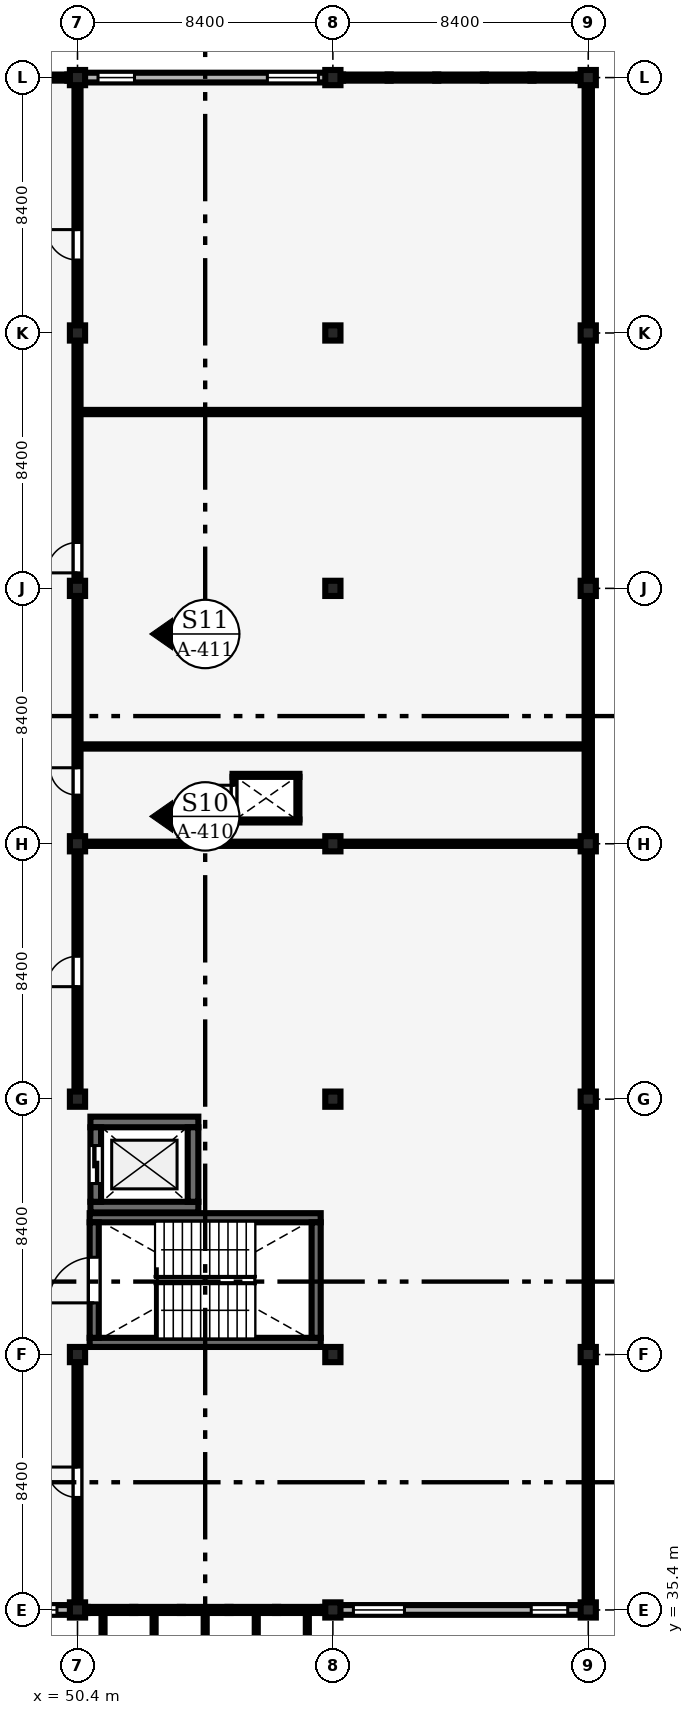
"""IFC4 building model, lengths in metres.
Left out: names, types, materials, properties, quantities, classifications, styles, units other than length and angle.
Written with IfcOpenShell. Run it as: python <this file> out.ifc"""

import sys

from ifc_helpers import new_model, si_unit, direction, frame, frame_2d, origin, origin_2d, place, context, subcontext, project, spatial, rectangle, extrude, element, fill, save


model = new_model("IFC4")
c1 = context("Model", 3, precision=1e-05, world=origin(), true_north=direction((0.0, 1.0)))
c2 = subcontext(c1, "Body", "Model", "MODEL_VIEW")
j1 = project(units=[si_unit("LENGTHUNIT", "METRE"), si_unit("PLANEANGLEUNIT", "RADIAN")], contexts=[c1])
p1 = place(None, origin())
s1 = spatial("IfcSite", under=j1, at=p1, CompositionType="ELEMENT")
p2 = place(p1, origin())
s2 = spatial("IfcBuilding", under=s1, at=p2, CompositionType="ELEMENT")
p3 = place(p2, frame((0.0, 0.0, 13.2)))
s3 = spatial("IfcBuildingStorey", under=s2, at=p3, CompositionType="ELEMENT", Elevation=13.2)
for number, where, z_axis, x_axis in (
    (1, (50.4, 35.4, 0.0), (0.0, 0.0, 1.0), (1.0, 0.0, 0.0)),
    (2, (50.4, 43.8, 0.0), (0.0, 0.0, 1.0), (1.0, 0.0, 0.0)),
    (3, (50.4, 52.2, 0.0), (0.0, 0.0, 1.0), (1.0, 0.0, 0.0)),
    (4, (50.4, 60.6, 0.0), (0.0, 0.0, 1.0), (1.0, 0.0, 0.0)),
    (5, (50.4, 69.0, 0.0), (0.0, 0.0, 1.0), (1.0, 0.0, 0.0)),
    (6, (50.4, 77.4, 0.0), (0.0, 0.0, 1.0), (1.0, 0.0, 0.0)),
    (7, (50.4, 85.8, 0.0), (0.0, 0.0, 1.0), (1.0, 0.0, 0.0)),
    (8, (58.8, 35.4, 0.0), (0.0, 0.0, 1.0), (1.0, 0.0, 0.0)),
    (9, (58.8, 43.8, 0.0), (0.0, 0.0, 1.0), (1.0, 0.0, 0.0)),
    (10, (58.8, 52.2, 0.0), (0.0, 0.0, 1.0), (1.0, 0.0, 0.0)),
    (11, (58.8, 60.6, 0.0), (0.0, 0.0, 1.0), (1.0, 0.0, 0.0)),
    (12, (58.8, 69.0, 0.0), (0.0, 0.0, 1.0), (1.0, 0.0, 0.0)),
    (13, (58.8, 77.4, 0.0), (0.0, 0.0, 1.0), (1.0, 0.0, 0.0)),
    (14, (58.8, 85.8, 0.0), (0.0, 0.0, 1.0), (1.0, 0.0, 0.0)),
    (15, (67.2, 35.4, 0.0), (0.0, 0.0, 1.0), (1.0, 0.0, 0.0)),
    (16, (67.2, 43.8, 0.0), (0.0, 0.0, 1.0), (1.0, 0.0, 0.0)),
    (17, (67.2, 52.2, 0.0), (0.0, 0.0, 1.0), (1.0, 0.0, 0.0)),
    (18, (67.2, 60.6, 0.0), (0.0, 0.0, 1.0), (1.0, 0.0, 0.0)),
    (19, (67.2, 69.0, 0.0), (0.0, 0.0, 1.0), (1.0, 0.0, 0.0)),
    (20, (67.2, 77.4, 0.0), (0.0, 0.0, 1.0), (1.0, 0.0, 0.0)),
    (21, (67.2, 85.8, 0.0), (0.0, 0.0, 1.0), (1.0, 0.0, 0.0)),
):
    element("IfcColumn", number, at=place(p3, frame(where, z_axis=z_axis, x_axis=x_axis)), inside=s3, PredefinedType="COLUMN", context=c2, shape_type="SweptSolid", body=[
        extrude(rectangle(XDim=0.5, YDim=0.5, at=origin_2d()), origin(), (0.0, 0.0, 1.0), 4.2),
    ])
p4 = place(p3, frame((42.225, 35.4, 0.0), z_axis=(0.0, 0.0, 1.0), x_axis=(1.0, 0.0, 0.0)))
e22 = element("IfcWall", 22, at=p4, inside=s3, PredefinedType="SOLIDWALL", context=c2, shape_type="SweptSolid", body=[
    extrude(rectangle(XDim=7.95, YDim=0.32, at=frame_2d((3.975, 0.0))), origin(), (0.0, 0.0, 1.0), 2.98),
])
p5 = place(p4, frame((0.45, 0.0, 0.9)))
e23 = element("IfcOpeningElement", 23, at=p5, cuts=e22, PredefinedType="OPENING", context=c2, shape_type="SweptSolid", body=[
    extrude(rectangle(XDim=1.2, YDim=1.5, at=frame_2d((0.6, 0.75))), frame((0.0, 0.17, 0.0), z_axis=(0.0, -1.0, 0.0), x_axis=(1.0, 0.0, 0.0)), (0.0, 0.0, 1.0), 0.34),
])
p6 = place(p4, frame((6.3, 0.0, 0.9)))
e24 = element("IfcOpeningElement", 24, at=p6, cuts=e22, PredefinedType="OPENING", context=c2, shape_type="SweptSolid", body=[
    extrude(rectangle(XDim=1.2, YDim=1.8, at=frame_2d((0.6, 0.9))), frame((0.0, 0.17, 0.0), z_axis=(0.0, -1.0, 0.0), x_axis=(1.0, 0.0, 0.0)), (0.0, 0.0, 1.0), 0.34),
])
p7 = place(p3, frame((59.025, 35.4, 0.0), z_axis=(0.0, 0.0, 1.0), x_axis=(1.0, 0.0, 0.0)))
e25 = element("IfcWall", 25, at=p7, inside=s3, PredefinedType="SOLIDWALL", context=c2, shape_type="SweptSolid", body=[
    extrude(rectangle(XDim=7.95, YDim=0.32, at=frame_2d((3.975, 0.0))), origin(), (0.0, 0.0, 1.0), 2.93),
])
p8 = place(p7, frame((0.45, 0.0, 0.9)))
e26 = element("IfcOpeningElement", 26, at=p8, cuts=e25, PredefinedType="OPENING", context=c2, shape_type="SweptSolid", body=[
    extrude(rectangle(XDim=1.68, YDim=1.88, at=frame_2d((0.84, 0.94))), frame((0.0, 0.17, 0.0), z_axis=(0.0, -1.0, 0.0), x_axis=(1.0, 0.0, 0.0)), (0.0, 0.0, 1.0), 0.34),
])
p9 = place(p7, frame((6.3, 0.0, 0.9)))
e27 = element("IfcOpeningElement", 27, at=p9, cuts=e25, PredefinedType="OPENING", context=c2, shape_type="SweptSolid", body=[
    extrude(rectangle(XDim=1.2, YDim=1.5, at=frame_2d((0.6, 0.75))), frame((0.0, 0.17, 0.0), z_axis=(0.0, -1.0, 0.0), x_axis=(1.0, 0.0, 0.0)), (0.0, 0.0, 1.0), 0.34),
])
p10 = place(p3, frame((67.2, 35.625, 0.0), z_axis=(0.0, 0.0, 1.0), x_axis=(0.0, 1.0, 0.0)))
e28 = element("IfcWall", 28, at=p10, inside=s3, PredefinedType="SOLIDWALL", context=c2, shape_type="SweptSolid", body=[
    extrude(rectangle(XDim=7.95, YDim=0.24, at=frame_2d((3.975, 0.0))), origin(), (0.0, 0.0, 1.0), 1.15),
])
p11 = place(p3, frame((67.2, 44.025, 0.0), z_axis=(0.0, 0.0, 1.0), x_axis=(0.0, 1.0, 0.0)))
e29 = element("IfcWall", 29, at=p11, inside=s3, PredefinedType="SOLIDWALL", context=c2, shape_type="SweptSolid", body=[
    extrude(rectangle(XDim=7.95, YDim=0.24, at=frame_2d((3.975, 0.0))), origin(), (0.0, 0.0, 1.0), 1.15),
])
for number, where, z_axis, x_axis in (
    (30, (67.2, 52.425, 0.0), (0.0, 0.0, 1.0), (0.0, 1.0, 0.0)),
    (31, (67.2, 60.825, 0.0), (0.0, 0.0, 1.0), (0.0, 1.0, 0.0)),
    (32, (67.2, 69.225, 0.0), (0.0, 0.0, 1.0), (0.0, 1.0, 0.0)),
    (33, (67.2, 77.625, 0.0), (0.0, 0.0, 1.0), (0.0, 1.0, 0.0)),
):
    element("IfcWall", number, at=place(p3, frame(where, z_axis=z_axis, x_axis=x_axis)), inside=s3, PredefinedType="SOLIDWALL", context=c2, shape_type="SweptSolid", body=[
        extrude(rectangle(XDim=7.95, YDim=0.24, at=frame_2d((3.975, 0.0))), origin(), (0.0, 0.0, 1.0), 1.15),
    ])
p12 = place(p3, frame((50.625, 85.8, 0.0), z_axis=(0.0, 0.0, 1.0), x_axis=(1.0, 0.0, 0.0)))
e34 = element("IfcWall", 34, at=p12, inside=s3, PredefinedType="SOLIDWALL", context=c2, shape_type="SweptSolid", body=[
    extrude(rectangle(XDim=7.95, YDim=0.32, at=frame_2d((3.975, 0.0))), origin(), (0.0, 0.0, 1.0), 3.16),
])
p13 = place(p12, frame((0.45, 0.0, 0.9)))
e35 = element("IfcOpeningElement", 35, at=p13, cuts=e34, PredefinedType="OPENING", context=c2, shape_type="SweptSolid", body=[
    extrude(rectangle(XDim=1.2, YDim=1.8, at=frame_2d((0.6, 0.9))), frame((0.0, 0.17, 0.0), z_axis=(0.0, -1.0, 0.0), x_axis=(1.0, 0.0, 0.0)), (0.0, 0.0, 1.0), 0.34),
])
p14 = place(p12, frame((6.02, 0.0, 0.9)))
e36 = element("IfcOpeningElement", 36, at=p14, cuts=e34, PredefinedType="OPENING", context=c2, shape_type="SweptSolid", body=[
    extrude(rectangle(XDim=1.68, YDim=2.11, at=frame_2d((0.84, 1.055))), frame((0.0, 0.17, 0.0), z_axis=(0.0, -1.0, 0.0), x_axis=(1.0, 0.0, 0.0)), (0.0, 0.0, 1.0), 0.34),
])
for number, where, z_axis, x_axis in (
    (37, (50.8, 44.2, 0.0), (0.0, 0.0, 1.0), (1.0, 0.0, 0.0)),
    (38, (50.8, 48.3, 0.0), (0.0, 0.0, 1.0), (1.0, 0.0, 0.0)),
):
    element("IfcWall", number, at=place(p3, frame(where, z_axis=z_axis, x_axis=x_axis)), inside=s3, PredefinedType="SHEAR", context=c2, shape_type="SweptSolid", body=[
        extrude(rectangle(XDim=7.6, YDim=0.3, at=frame_2d((3.8, 0.0))), origin(), (0.0, 0.0, 1.0), 4.025),
    ])
p15 = place(p3, frame((50.95, 44.35, 0.0), z_axis=(0.0, 0.0, 1.0), x_axis=(0.0, 1.0, 0.0)))
e39 = element("IfcWall", 39, at=p15, inside=s3, PredefinedType="SHEAR", context=c2, shape_type="SweptSolid", body=[
    extrude(rectangle(XDim=3.8, YDim=0.3, at=frame_2d((1.9, 0.0))), origin(), (0.0, 0.0, 1.0), 4.025),
])
p16 = place(p15, frame((1.15, 0.0, 0.0)))
e40 = element("IfcOpeningElement", 40, at=p16, cuts=e39, PredefinedType="OPENING", context=c2, shape_type="SweptSolid", body=[
    extrude(rectangle(XDim=1.5, YDim=2.2, at=frame_2d((0.75, 1.1))), frame((0.0, 0.16, 0.0), z_axis=(0.0, -1.0, 0.0), x_axis=(1.0, 0.0, 0.0)), (0.0, 0.0, 1.0), 0.32),
])
p17 = place(p3, frame((58.25, 44.35, 0.0), z_axis=(0.0, 0.0, 1.0), x_axis=(0.0, 1.0, 0.0)))
e41 = element("IfcWall", 41, at=p17, inside=s3, PredefinedType="SHEAR", context=c2, shape_type="SweptSolid", body=[
    extrude(rectangle(XDim=3.8, YDim=0.3, at=frame_2d((1.9, 0.0))), origin(), (0.0, 0.0, 1.0), 4.025),
])
for number, where, z_axis, x_axis in (
    (42, (50.825, 48.65, 0.0), (0.0, 0.0, 1.0), (1.0, 0.0, 0.0)),
    (43, (50.825, 51.45, 0.0), (0.0, 0.0, 1.0), (1.0, 0.0, 0.0)),
):
    element("IfcWall", number, at=place(p3, frame(where, z_axis=z_axis, x_axis=x_axis)), inside=s3, PredefinedType="SHEAR", context=c2, shape_type="SweptSolid", body=[
        extrude(rectangle(XDim=3.55, YDim=0.35, at=frame_2d((1.775, 0.0))), origin(), (0.0, 0.0, 1.0), 3.92),
    ])
p18 = place(p3, frame((51.0, 48.825, 0.0), z_axis=(0.0, 0.0, 1.0), x_axis=(0.0, 1.0, 0.0)))
e44 = element("IfcWall", 44, at=p18, inside=s3, PredefinedType="SHEAR", context=c2, shape_type="SweptSolid", body=[
    extrude(rectangle(XDim=2.45, YDim=0.35, at=frame_2d((1.225, 0.0))), origin(), (0.0, 0.0, 1.0), 3.92),
])
p19 = place(p18, frame((0.6, 0.0, 0.0)))
e45 = element("IfcOpeningElement", 45, at=p19, cuts=e44, PredefinedType="OPENING", context=c2, shape_type="SweptSolid", body=[
    extrude(rectangle(XDim=1.25, YDim=2.25, at=frame_2d((0.625, 1.125))), frame((0.0, 0.185, 0.0), z_axis=(0.0, -1.0, 0.0), x_axis=(1.0, 0.0, 0.0)), (0.0, 0.0, 1.0), 0.37),
])
p20 = place(p3, frame((54.2, 48.825, 0.0), z_axis=(0.0, 0.0, 1.0), x_axis=(0.0, 1.0, 0.0)))
e46 = element("IfcWall", 46, at=p20, inside=s3, PredefinedType="SHEAR", context=c2, shape_type="SweptSolid", body=[
    extrude(rectangle(XDim=2.45, YDim=0.35, at=frame_2d((1.225, 0.0))), origin(), (0.0, 0.0, 1.0), 3.92),
])
for number, where, z_axis, x_axis in (
    (47, (55.5, 61.35, 0.0), (0.0, 0.0, 1.0), (1.0, 0.0, 0.0)),
    (48, (55.5, 62.85, 0.0), (0.0, 0.0, 1.0), (1.0, 0.0, 0.0)),
):
    element("IfcWall", number, at=place(p3, frame(where, z_axis=z_axis, x_axis=x_axis)), inside=s3, PredefinedType="PARTITIONING", context=c2, shape_type="SweptSolid", body=[
        extrude(rectangle(XDim=2.2, YDim=0.1, at=frame_2d((1.1, 0.0))), origin(), (0.0, 0.0, 1.0), 3.9),
    ])
p21 = place(p3, frame((55.55, 61.4, 0.0), z_axis=(0.0, 0.0, 1.0), x_axis=(0.0, 1.0, 0.0)))
e49 = element("IfcWall", 49, at=p21, inside=s3, PredefinedType="PARTITIONING", context=c2, shape_type="SweptSolid", body=[
    extrude(rectangle(XDim=1.4, YDim=0.1, at=frame_2d((0.7, 0.0))), origin(), (0.0, 0.0, 1.0), 3.9),
])
p22 = place(p21, frame((0.275, 0.0, 0.0)))
e50 = element("IfcOpeningElement", 50, at=p22, cuts=e49, PredefinedType="OPENING", context=c2, shape_type="SweptSolid", body=[
    extrude(rectangle(XDim=0.85, YDim=2.05, at=frame_2d((0.425, 1.025))), frame((0.0, 0.06, 0.0), z_axis=(0.0, -1.0, 0.0), x_axis=(1.0, 0.0, 0.0)), (0.0, 0.0, 1.0), 0.12),
])
p23 = place(p3, frame((57.65, 61.4, 0.0), z_axis=(0.0, 0.0, 1.0), x_axis=(0.0, 1.0, 0.0)))
e51 = element("IfcWall", 51, at=p23, inside=s3, PredefinedType="PARTITIONING", context=c2, shape_type="SweptSolid", body=[
    extrude(rectangle(XDim=1.4, YDim=0.1, at=frame_2d((0.7, 0.0))), origin(), (0.0, 0.0, 1.0), 3.9),
])
p24 = place(p3, frame((50.4, 35.565, 0.0), z_axis=(0.0, 0.0, 1.0), x_axis=(0.0, 1.0, 0.0)))
e52 = element("IfcWall", 52, at=p24, inside=s3, PredefinedType="PARTITIONING", context=c2, shape_type="SweptSolid", body=[
    extrude(rectangle(XDim=7.975, YDim=0.2, at=frame_2d((3.988, 0.0))), origin(), (0.0, 0.0, 1.0), 2.83),
])
p25 = place(p24, frame((3.535, 0.0, 0.0)))
e53 = element("IfcOpeningElement", 53, at=p25, cuts=e52, PredefinedType="OPENING", context=c2, shape_type="SweptSolid", body=[
    extrude(rectangle(XDim=1.0, YDim=2.15, at=frame_2d((0.5, 1.075))), frame((0.0, 0.11, 0.0), z_axis=(0.0, -1.0, 0.0), x_axis=(1.0, 0.0, 0.0)), (0.0, 0.0, 1.0), 0.22),
])
p26 = place(p3, frame((50.505, 60.6, 0.0), z_axis=(0.0, 0.0, 1.0), x_axis=(1.0, 0.0, 0.0)))
e54 = element("IfcWall", 54, at=p26, inside=s3, PredefinedType="PARTITIONING", context=c2, shape_type="SweptSolid", body=[
    extrude(rectangle(XDim=8.035, YDim=0.14, at=frame_2d((4.018, 0.0))), origin(), (0.0, 0.0, 1.0), 3.11),
])
p27 = place(p3, frame((59.06, 60.6, 0.0), z_axis=(0.0, 0.0, 1.0), x_axis=(1.0, 0.0, 0.0)))
e55 = element("IfcWall", 55, at=p27, inside=s3, PredefinedType="PARTITIONING", context=c2, shape_type="SweptSolid", body=[
    extrude(rectangle(XDim=8.015, YDim=0.14, at=frame_2d((4.007, 0.0))), origin(), (0.0, 0.0, 1.0), 3.11),
])
for number, where, z_axis, x_axis in (
    (56, (50.505, 63.8, 0.0), (0.0, 0.0, 1.0), (1.0, 0.0, 0.0)),
    (57, (50.505, 74.8, 0.0), (0.0, 0.0, 1.0), (1.0, 0.0, 0.0)),
):
    element("IfcWall", number, at=place(p3, frame(where, z_axis=z_axis, x_axis=x_axis)), inside=s3, PredefinedType="PARTITIONING", context=c2, shape_type="SweptSolid", body=[
        extrude(rectangle(XDim=16.57, YDim=0.14, at=frame_2d((8.285, 0.0))), origin(), (0.0, 0.0, 1.0), 3.51),
    ])
p28 = place(p3, frame((50.4, 52.46, 0.0), z_axis=(0.0, 0.0, 1.0), x_axis=(0.0, 1.0, 0.0)))
e58 = element("IfcWall", 58, at=p28, inside=s3, PredefinedType="PARTITIONING", context=c2, shape_type="SweptSolid", body=[
    extrude(rectangle(XDim=7.88, YDim=0.2, at=frame_2d((3.94, 0.0))), origin(), (0.0, 0.0, 1.0), 3.36),
])
p29 = place(p28, frame((3.44, 0.0, 0.0)))
e59 = element("IfcOpeningElement", 59, at=p29, cuts=e58, PredefinedType="OPENING", context=c2, shape_type="SweptSolid", body=[
    extrude(rectangle(XDim=1.0, YDim=2.15, at=frame_2d((0.5, 1.075))), frame((0.0, 0.11, 0.0), z_axis=(0.0, -1.0, 0.0), x_axis=(1.0, 0.0, 0.0)), (0.0, 0.0, 1.0), 0.22),
])
p30 = place(p3, frame((50.4, 60.86, 0.0), z_axis=(0.0, 0.0, 1.0), x_axis=(0.0, 1.0, 0.0)))
e60 = element("IfcWall", 60, at=p30, inside=s3, PredefinedType="PARTITIONING", context=c2, shape_type="SweptSolid", body=[
    extrude(rectangle(XDim=7.88, YDim=0.2, at=frame_2d((3.94, 0.0))), origin(), (0.0, 0.0, 1.0), 3.36),
])
p31 = place(p30, frame((1.34, 0.0, 0.0)))
e61 = element("IfcOpeningElement", 61, at=p31, cuts=e60, PredefinedType="OPENING", context=c2, shape_type="SweptSolid", body=[
    extrude(rectangle(XDim=0.9, YDim=2.1, at=frame_2d((0.45, 1.05))), frame((0.0, 0.11, 0.0), z_axis=(0.0, -1.0, 0.0), x_axis=(1.0, 0.0, 0.0)), (0.0, 0.0, 1.0), 0.22),
])
p32 = place(p3, frame((50.4, 69.26, 0.0), z_axis=(0.0, 0.0, 1.0), x_axis=(0.0, 1.0, 0.0)))
e62 = element("IfcWall", 62, at=p32, inside=s3, PredefinedType="PARTITIONING", context=c2, shape_type="SweptSolid", body=[
    extrude(rectangle(XDim=7.88, YDim=0.2, at=frame_2d((3.94, 0.0))), origin(), (0.0, 0.0, 1.0), 3.31),
])
p33 = place(p32, frame((0.25, 0.0, 0.0)))
e63 = element("IfcOpeningElement", 63, at=p33, cuts=e62, PredefinedType="OPENING", context=c2, shape_type="SweptSolid", body=[
    extrude(rectangle(XDim=1.0, YDim=2.15, at=frame_2d((0.5, 1.075))), frame((0.0, 0.11, 0.0), z_axis=(0.0, -1.0, 0.0), x_axis=(1.0, 0.0, 0.0)), (0.0, 0.0, 1.0), 0.22),
])
p34 = place(p3, frame((50.4, 77.66, 0.0), z_axis=(0.0, 0.0, 1.0), x_axis=(0.0, 1.0, 0.0)))
e64 = element("IfcWall", 64, at=p34, inside=s3, PredefinedType="PARTITIONING", context=c2, shape_type="SweptSolid", body=[
    extrude(rectangle(XDim=8.035, YDim=0.2, at=frame_2d((4.018, 0.0))), origin(), (0.0, 0.0, 1.0), 3.26),
])
p35 = place(p34, frame((2.14, 0.0, 0.0)))
e65 = element("IfcOpeningElement", 65, at=p35, cuts=e64, PredefinedType="OPENING", context=c2, shape_type="SweptSolid", body=[
    extrude(rectangle(XDim=1.0, YDim=2.15, at=frame_2d((0.5, 1.075))), frame((0.0, 0.11, 0.0), z_axis=(0.0, -1.0, 0.0), x_axis=(1.0, 0.0, 0.0)), (0.0, 0.0, 1.0), 0.22),
])
p36 = place(p6, origin())
e66 = element("IfcWindow", 66, at=p36, inside=s3, PartitioningType="SINGLE_PANEL", PredefinedType="WINDOW", context=c2, shape_type="SweptSolid", body=[
    extrude(rectangle(XDim=1.2, YDim=1.8, at=frame_2d((0.6, 0.9))), frame((0.0, 0.03, 0.0), z_axis=(0.0, -1.0, 0.0), x_axis=(1.0, 0.0, 0.0)), (0.0, 0.0, 1.0), 0.06),
])
fill(e24, e66)
p37 = place(p8, origin())
e67 = element("IfcWindow", 67, at=p37, inside=s3, PartitioningType="SINGLE_PANEL", PredefinedType="WINDOW", context=c2, shape_type="SweptSolid", body=[
    extrude(rectangle(XDim=1.68, YDim=1.88, at=frame_2d((0.84, 0.94))), frame((0.0, 0.03, 0.0), z_axis=(0.0, -1.0, 0.0), x_axis=(1.0, 0.0, 0.0)), (0.0, 0.0, 1.0), 0.06),
])
fill(e26, e67)
p38 = place(p9, origin())
e68 = element("IfcWindow", 68, at=p38, inside=s3, PartitioningType="SINGLE_PANEL", PredefinedType="WINDOW", context=c2, shape_type="SweptSolid", body=[
    extrude(rectangle(XDim=1.2, YDim=1.5, at=frame_2d((0.6, 0.75))), frame((0.0, 0.03, 0.0), z_axis=(0.0, -1.0, 0.0), x_axis=(1.0, 0.0, 0.0)), (0.0, 0.0, 1.0), 0.06),
])
fill(e27, e68)
p39 = place(p13, origin())
e69 = element("IfcWindow", 69, at=p39, inside=s3, PartitioningType="SINGLE_PANEL", PredefinedType="WINDOW", context=c2, shape_type="SweptSolid", body=[
    extrude(rectangle(XDim=1.2, YDim=1.8, at=frame_2d((0.6, 0.9))), frame((0.0, 0.03, 0.0), z_axis=(0.0, -1.0, 0.0), x_axis=(1.0, 0.0, 0.0)), (0.0, 0.0, 1.0), 0.06),
])
fill(e35, e69)
p40 = place(p14, origin())
e70 = element("IfcWindow", 70, at=p40, inside=s3, PartitioningType="SINGLE_PANEL", PredefinedType="WINDOW", context=c2, shape_type="SweptSolid", body=[
    extrude(rectangle(XDim=1.68, YDim=2.11, at=frame_2d((0.84, 1.055))), frame((0.0, 0.03, 0.0), z_axis=(0.0, -1.0, 0.0), x_axis=(1.0, 0.0, 0.0)), (0.0, 0.0, 1.0), 0.06),
])
fill(e36, e70)
p41 = place(p16, origin())
e71 = element("IfcDoor", 71, at=p41, inside=s3, OperationType="DOUBLE_DOOR_SINGLE_SWING", PredefinedType="DOOR", context=c2, shape_type="SweptSolid", body=[
    extrude(rectangle(XDim=1.5, YDim=2.2, at=frame_2d((0.75, 1.1))), frame((0.0, 0.025, 0.0), z_axis=(0.0, -1.0, 0.0), x_axis=(1.0, 0.0, 0.0)), (0.0, 0.0, 1.0), 0.05),
])
fill(e40, e71)
p42 = place(p19, origin())
e72 = element("IfcDoor", 72, at=p42, inside=s3, OperationType="DOUBLE_DOOR_SLIDING", PredefinedType="DOOR", context=c2, shape_type="SweptSolid", body=[
    extrude(rectangle(XDim=1.25, YDim=2.25, at=frame_2d((0.625, 1.125))), frame((0.0, 0.025, 0.0), z_axis=(0.0, -1.0, 0.0), x_axis=(1.0, 0.0, 0.0)), (0.0, 0.0, 1.0), 0.05),
])
fill(e45, e72)
p43 = place(p22, origin())
e73 = element("IfcDoor", 73, at=p43, inside=s3, OperationType="SINGLE_SWING_RIGHT", PredefinedType="DOOR", context=c2, shape_type="SweptSolid", body=[
    extrude(rectangle(XDim=0.85, YDim=2.05, at=frame_2d((0.425, 1.025))), frame((0.0, 0.025, 0.0), z_axis=(0.0, -1.0, 0.0), x_axis=(1.0, 0.0, 0.0)), (0.0, 0.0, 1.0), 0.05),
])
fill(e50, e73)
p44 = place(p25, origin())
e74 = element("IfcDoor", 74, at=p44, inside=s3, OperationType="SINGLE_SWING_RIGHT", PredefinedType="DOOR", context=c2, shape_type="SweptSolid", body=[
    extrude(rectangle(XDim=1.0, YDim=2.15, at=frame_2d((0.5, 1.075))), frame((0.0, 0.025, 0.0), z_axis=(0.0, -1.0, 0.0), x_axis=(1.0, 0.0, 0.0)), (0.0, 0.0, 1.0), 0.05),
])
fill(e53, e74)
p45 = place(p29, origin())
e75 = element("IfcDoor", 75, at=p45, inside=s3, OperationType="SINGLE_SWING_LEFT", PredefinedType="DOOR", context=c2, shape_type="SweptSolid", body=[
    extrude(rectangle(XDim=1.0, YDim=2.15, at=frame_2d((0.5, 1.075))), frame((0.0, 0.025, 0.0), z_axis=(0.0, -1.0, 0.0), x_axis=(1.0, 0.0, 0.0)), (0.0, 0.0, 1.0), 0.05),
])
fill(e59, e75)
p46 = place(p31, origin())
e76 = element("IfcDoor", 76, at=p46, inside=s3, OperationType="SINGLE_SWING_RIGHT", PredefinedType="DOOR", context=c2, shape_type="SweptSolid", body=[
    extrude(rectangle(XDim=0.9, YDim=2.1, at=frame_2d((0.45, 1.05))), frame((0.0, 0.025, 0.0), z_axis=(0.0, -1.0, 0.0), x_axis=(1.0, 0.0, 0.0)), (0.0, 0.0, 1.0), 0.05),
])
fill(e61, e76)
p47 = place(p33, origin())
e77 = element("IfcDoor", 77, at=p47, inside=s3, OperationType="SINGLE_SWING_LEFT", PredefinedType="DOOR", context=c2, shape_type="SweptSolid", body=[
    extrude(rectangle(XDim=1.0, YDim=2.15, at=frame_2d((0.5, 1.075))), frame((0.0, 0.025, 0.0), z_axis=(0.0, -1.0, 0.0), x_axis=(1.0, 0.0, 0.0)), (0.0, 0.0, 1.0), 0.05),
])
fill(e63, e77)
p48 = place(p35, origin())
e78 = element("IfcDoor", 78, at=p48, inside=s3, OperationType="SINGLE_SWING_RIGHT", PredefinedType="DOOR", context=c2, shape_type="SweptSolid", body=[
    extrude(rectangle(XDim=1.0, YDim=2.15, at=frame_2d((0.5, 1.075))), frame((0.0, 0.025, 0.0), z_axis=(0.0, -1.0, 0.0), x_axis=(1.0, 0.0, 0.0)), (0.0, 0.0, 1.0), 0.05),
])
fill(e65, e78)
save(model, sys.argv[1])
